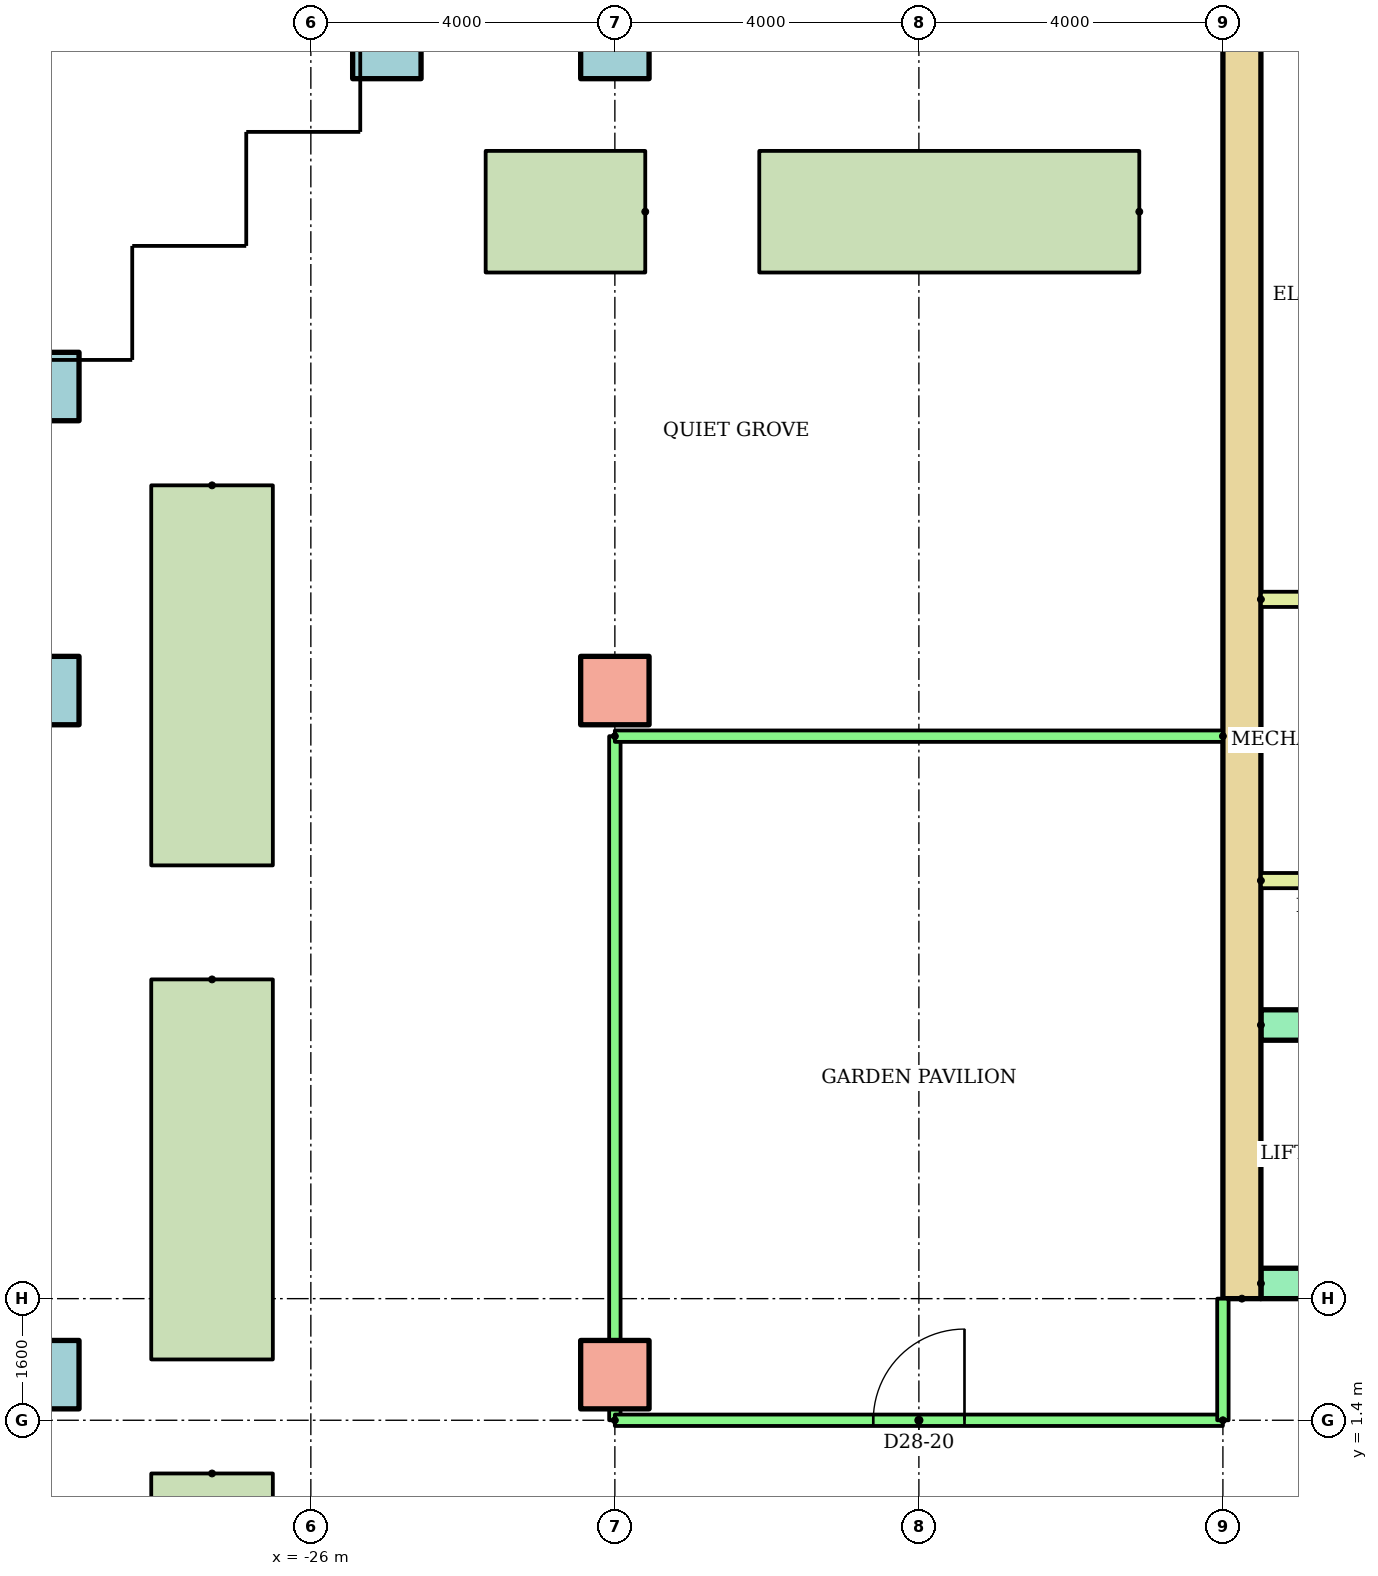
"""IFC4 building model, lengths in metres.
Left out: names, types, materials, properties, quantities, classifications, styles, units other than length and angle.
Written with IfcOpenShell. Run it as: python <this file> out.ifc"""

import sys

from ifc_helpers import new_model, si_unit, direction, frame, frame_2d, origin, origin_2d, place, context, subcontext, project, spatial, rectangle, hollow_rectangle, extrude, element, fill, save


model = new_model("IFC4")
c1 = context("Model", 3, precision=1e-05, world=origin(), true_north=direction((0.0, 1.0)))
c2 = subcontext(c1, "Body", "Model", "MODEL_VIEW")
j1 = project(units=[si_unit("LENGTHUNIT", "METRE"), si_unit("PLANEANGLEUNIT", "RADIAN")], contexts=[c1])
p1 = place(None, origin())
s1 = spatial("IfcSite", under=j1, at=p1, CompositionType="ELEMENT")
p2 = place(p1, origin())
s2 = spatial("IfcBuilding", under=s1, at=p2, CompositionType="ELEMENT")
p3 = place(p2, frame((0.0, 0.0, 106.3)))
s3 = spatial("IfcBuildingStorey", under=s2, at=p3, CompositionType="ELEMENT", Elevation=106.3)
p4 = place(p3, frame((-29.5, 2.0, 0.0)))
e1 = element("IfcColumn", 1, at=p4, inside=s3, PredefinedType="COLUMN", context=c2, shape_type="SweptSolid", body=[
    extrude(hollow_rectangle(XDim=0.9, YDim=0.9, WallThickness=0.045, at=origin_2d()), origin(), (0.0, 0.0, 1.0), 8.8),
])
p5 = place(p3, frame((-22.0, 2.0, 0.0)))
e2 = element("IfcColumn", 2, at=p5, inside=s3, PredefinedType="COLUMN", context=c2, shape_type="SweptSolid", body=[
    extrude(rectangle(XDim=0.9, YDim=0.9, at=origin_2d()), origin(), (0.0, 0.0, 1.0), 9.6),
])
p6 = place(p3, frame((-29.5, 11.0, 0.0)))
e3 = element("IfcColumn", 3, at=p6, inside=s3, PredefinedType="COLUMN", context=c2, shape_type="SweptSolid", body=[
    extrude(hollow_rectangle(XDim=0.9, YDim=0.9, WallThickness=0.045, at=origin_2d()), origin(), (0.0, 0.0, 1.0), 8.8),
])
p7 = place(p3, frame((-22.0, 11.0, 0.0)))
e4 = element("IfcColumn", 4, at=p7, inside=s3, PredefinedType="COLUMN", context=c2, shape_type="SweptSolid", body=[
    extrude(rectangle(XDim=0.9, YDim=0.9, at=origin_2d()), origin(), (0.0, 0.0, 1.0), 9.6),
])
for number, where in (
    (5, (-29.5, 15.0, 0.0)),
    (6, (-25.0, 19.5, 0.0)),
):
    element("IfcColumn", number, at=place(p3, frame(where)), inside=s3, PredefinedType="COLUMN", context=c2, shape_type="SweptSolid", body=[
        extrude(hollow_rectangle(XDim=0.9, YDim=0.9, WallThickness=0.045, at=origin_2d()), origin(), (0.0, 0.0, 1.0), 8.8),
    ])
p8 = place(p3, frame((-22.0, 19.5, 0.0)))
e7 = element("IfcColumn", 7, at=p8, inside=s3, PredefinedType="COLUMN", context=c2, shape_type="SweptSolid", body=[
    extrude(hollow_rectangle(XDim=0.9, YDim=0.9, WallThickness=0.045, at=origin_2d()), origin(), (0.0, 0.0, 1.0), 9.6),
])
p9 = place(p3, frame((-15.1, 17.3, 0.0), z_axis=(0.0, 0.0, 1.0), x_axis=(-1.0, 0.0, 0.0)))
e8 = element("IfcWall", 8, at=p9, inside=s3, PredefinedType="STANDARD", context=c2, shape_type="SweptSolid", body=[
    extrude(rectangle(XDim=5.0, YDim=1.6, at=frame_2d((2.5, 0.0))), origin(), (0.0, 0.0, 1.0), 0.8),
])
p10 = place(p3, frame((-21.6, 17.3, 0.0), z_axis=(0.0, 0.0, 1.0), x_axis=(-1.0, 0.0, 0.0)))
e9 = element("IfcWall", 9, at=p10, inside=s3, PredefinedType="STANDARD", context=c2, shape_type="SweptSolid", body=[
    extrude(rectangle(XDim=2.1, YDim=1.6, at=frame_2d((1.05, 0.0))), origin(), (0.0, 0.0, 1.0), 0.8),
])
for number, where, z_axis, x_axis in (
    (10, (-27.3, 13.7, 0.0), (0.0, 0.0, 1.0), (0.0, -1.0, 0.0)),
    (11, (-27.3, 7.2, 0.0), (0.0, 0.0, 1.0), (0.0, -1.0, 0.0)),
):
    element("IfcWall", number, at=place(p3, frame(where, z_axis=z_axis, x_axis=x_axis)), inside=s3, PredefinedType="STANDARD", context=c2, shape_type="SweptSolid", body=[
        extrude(rectangle(XDim=5.0, YDim=1.6, at=frame_2d((2.5, 0.0))), origin(), (0.0, 0.0, 1.0), 0.8),
    ])
p11 = place(p3, frame((-13.75, 3.0, 0.0), z_axis=(0.0, 0.0, 1.0), x_axis=(0.0, 1.0, 0.0)))
e12 = element("IfcWall", 12, at=p11, inside=s3, PredefinedType="SHEAR", context=c2, shape_type="SweptSolid", body=[
    extrude(rectangle(XDim=17.0, YDim=0.5, at=frame_2d((8.5, 0.0))), origin(), (0.0, 0.0, 1.0), 8.8),
])
p12 = place(p3, frame((-13.5, 3.2, 0.0)))
e13 = element("IfcWall", 13, at=p12, inside=s3, PredefinedType="SHEAR", context=c2, shape_type="SweptSolid", body=[
    extrude(rectangle(XDim=27.0, YDim=0.4, at=frame_2d((13.5, 0.0))), origin(), (0.0, 0.0, 1.0), 8.8),
])
p13 = place(p12, frame((6.861, 0.0, 0.0)))
e14 = element("IfcOpeningElement", 14, at=p13, cuts=e13, PredefinedType="OPENING", context=c2, shape_type="SweptSolid", body=[
    extrude(rectangle(XDim=1.1, YDim=2.1, at=frame_2d((0.55, 1.05))), frame((0.0, 0.21, 0.0), z_axis=(0.0, -1.0, 0.0), x_axis=(1.0, 0.0, 0.0)), (0.0, 0.0, 1.0), 0.42),
])
p14 = place(p12, frame((9.906, 0.0, 0.0)))
e15 = element("IfcOpeningElement", 15, at=p14, cuts=e13, PredefinedType="OPENING", context=c2, shape_type="SweptSolid", body=[
    extrude(rectangle(XDim=1.1, YDim=2.1, at=frame_2d((0.55, 1.05))), frame((0.0, 0.21, 0.0), z_axis=(0.0, -1.0, 0.0), x_axis=(1.0, 0.0, 0.0)), (0.0, 0.0, 1.0), 0.42),
])
p15 = place(p12, frame((15.994, 0.0, 0.0)))
e16 = element("IfcOpeningElement", 16, at=p15, cuts=e13, PredefinedType="OPENING", context=c2, shape_type="SweptSolid", body=[
    extrude(rectangle(XDim=1.1, YDim=2.1, at=frame_2d((0.55, 1.05))), frame((0.0, 0.21, 0.0), z_axis=(0.0, -1.0, 0.0), x_axis=(1.0, 0.0, 0.0)), (0.0, 0.0, 1.0), 0.42),
])
p16 = place(p12, frame((19.039, 0.0, 0.0)))
e17 = element("IfcOpeningElement", 17, at=p16, cuts=e13, PredefinedType="OPENING", context=c2, shape_type="SweptSolid", body=[
    extrude(rectangle(XDim=1.1, YDim=2.1, at=frame_2d((0.55, 1.05))), frame((0.0, 0.21, 0.0), z_axis=(0.0, -1.0, 0.0), x_axis=(1.0, 0.0, 0.0)), (0.0, 0.0, 1.0), 0.42),
])
p17 = place(p12, frame((12.6, 0.0, 0.0)))
e18 = element("IfcOpeningElement", 18, at=p17, cuts=e13, PredefinedType="OPENING", context=c2, shape_type="SweptSolid", body=[
    extrude(rectangle(XDim=1.8, YDim=2.1, at=frame_2d((0.9, 1.05))), frame((0.0, 0.21, 0.0), z_axis=(0.0, -1.0, 0.0), x_axis=(1.0, 0.0, 0.0)), (0.0, 0.0, 1.0), 0.42),
])
p18 = place(p3, frame((-13.5, 6.6, 0.0)))
e19 = element("IfcWall", 19, at=p18, inside=s3, PredefinedType="SHEAR", context=c2, shape_type="SweptSolid", body=[
    extrude(rectangle(XDim=11.978, YDim=0.4, at=frame_2d((5.989, 0.0))), origin(), (0.0, 0.0, 1.0), 8.8),
])
for number, where in (
    (20, (-13.5, 8.5, 0.0)),
    (21, (-13.5, 12.2, 0.0)),
):
    element("IfcWall", number, at=place(p3, frame(where)), inside=s3, PredefinedType="PARTITIONING", context=c2, shape_type="SweptSolid", body=[
        extrude(rectangle(XDim=3.9, YDim=0.2, at=frame_2d((1.95, 0.0))), origin(), (0.0, 0.0, 1.0), 8.8),
    ])
p19 = place(p3, frame((-22.0, 10.4, 0.0), z_axis=(0.0, 0.0, 1.0), x_axis=(0.0, -1.0, 0.0)))
e22 = element("IfcWall", 22, at=p19, inside=s3, PredefinedType="PARTITIONING", context=c2, shape_type="SweptSolid", body=[
    extrude(rectangle(XDim=9.0, YDim=0.15, at=frame_2d((4.5, 0.0))), origin(), (0.0, 0.0, 1.0), 8.8),
])
p20 = place(p3, frame((-14.0, 10.4, 0.0), z_axis=(0.0, 0.0, 1.0), x_axis=(-1.0, 0.0, 0.0)))
e23 = element("IfcWall", 23, at=p20, inside=s3, PredefinedType="PARTITIONING", context=c2, shape_type="SweptSolid", body=[
    extrude(rectangle(XDim=8.0, YDim=0.15, at=frame_2d((4.0, 0.0))), origin(), (0.0, 0.0, 1.0), 8.8),
])
p21 = place(p3, frame((-22.0, 1.4, 0.0)))
e24 = element("IfcWall", 24, at=p21, inside=s3, PredefinedType="PARTITIONING", context=c2, shape_type="SweptSolid", body=[
    extrude(rectangle(XDim=8.0, YDim=0.15, at=frame_2d((4.0, 0.0))), origin(), (0.0, 0.0, 1.0), 8.8),
])
p22 = place(p21, frame((3.4, 0.0, 0.0)))
e25 = element("IfcOpeningElement", 25, at=p22, cuts=e24, PredefinedType="OPENING", context=c2, shape_type="SweptSolid", body=[
    extrude(rectangle(XDim=1.2, YDim=2.1, at=frame_2d((0.6, 1.05))), frame((0.0, 0.085, 0.0), z_axis=(0.0, -1.0, 0.0), x_axis=(1.0, 0.0, 0.0)), (0.0, 0.0, 1.0), 0.17),
])
p23 = place(p3, frame((-14.0, 1.4, 0.0), z_axis=(0.0, 0.0, 1.0), x_axis=(0.0, 1.0, 0.0)))
e26 = element("IfcWall", 26, at=p23, inside=s3, PredefinedType="PARTITIONING", context=c2, shape_type="SweptSolid", body=[
    extrude(rectangle(XDim=1.6, YDim=0.15, at=frame_2d((0.8, 0.0))), origin(), (0.0, 0.0, 1.0), 8.8),
])
p24 = place(p3, frame((-27.3, 0.7, 0.0), z_axis=(0.0, 0.0, 1.0), x_axis=(0.0, -1.0, 0.0)))
e27 = element("IfcWall", 27, at=p24, inside=s3, PredefinedType="STANDARD", context=c2, shape_type="SweptSolid", body=[
    extrude(rectangle(XDim=2.05, YDim=1.6, at=frame_2d((1.025, 0.0))), origin(), (0.0, 0.0, 1.0), 0.8),
])
p25 = place(p22, origin())
e28 = element("IfcDoor", 28, at=p25, inside=s3, OperationType="SINGLE_SWING_RIGHT", PredefinedType="DOOR", context=c2, shape_type="SweptSolid", body=[
    extrude(rectangle(XDim=1.2, YDim=2.1, at=frame_2d((0.6, 1.05))), frame((0.0, 0.025, 0.0), z_axis=(0.0, -1.0, 0.0), x_axis=(1.0, 0.0, 0.0)), (0.0, 0.0, 1.0), 0.05),
])
fill(e25, e28)
save(model, sys.argv[1])
